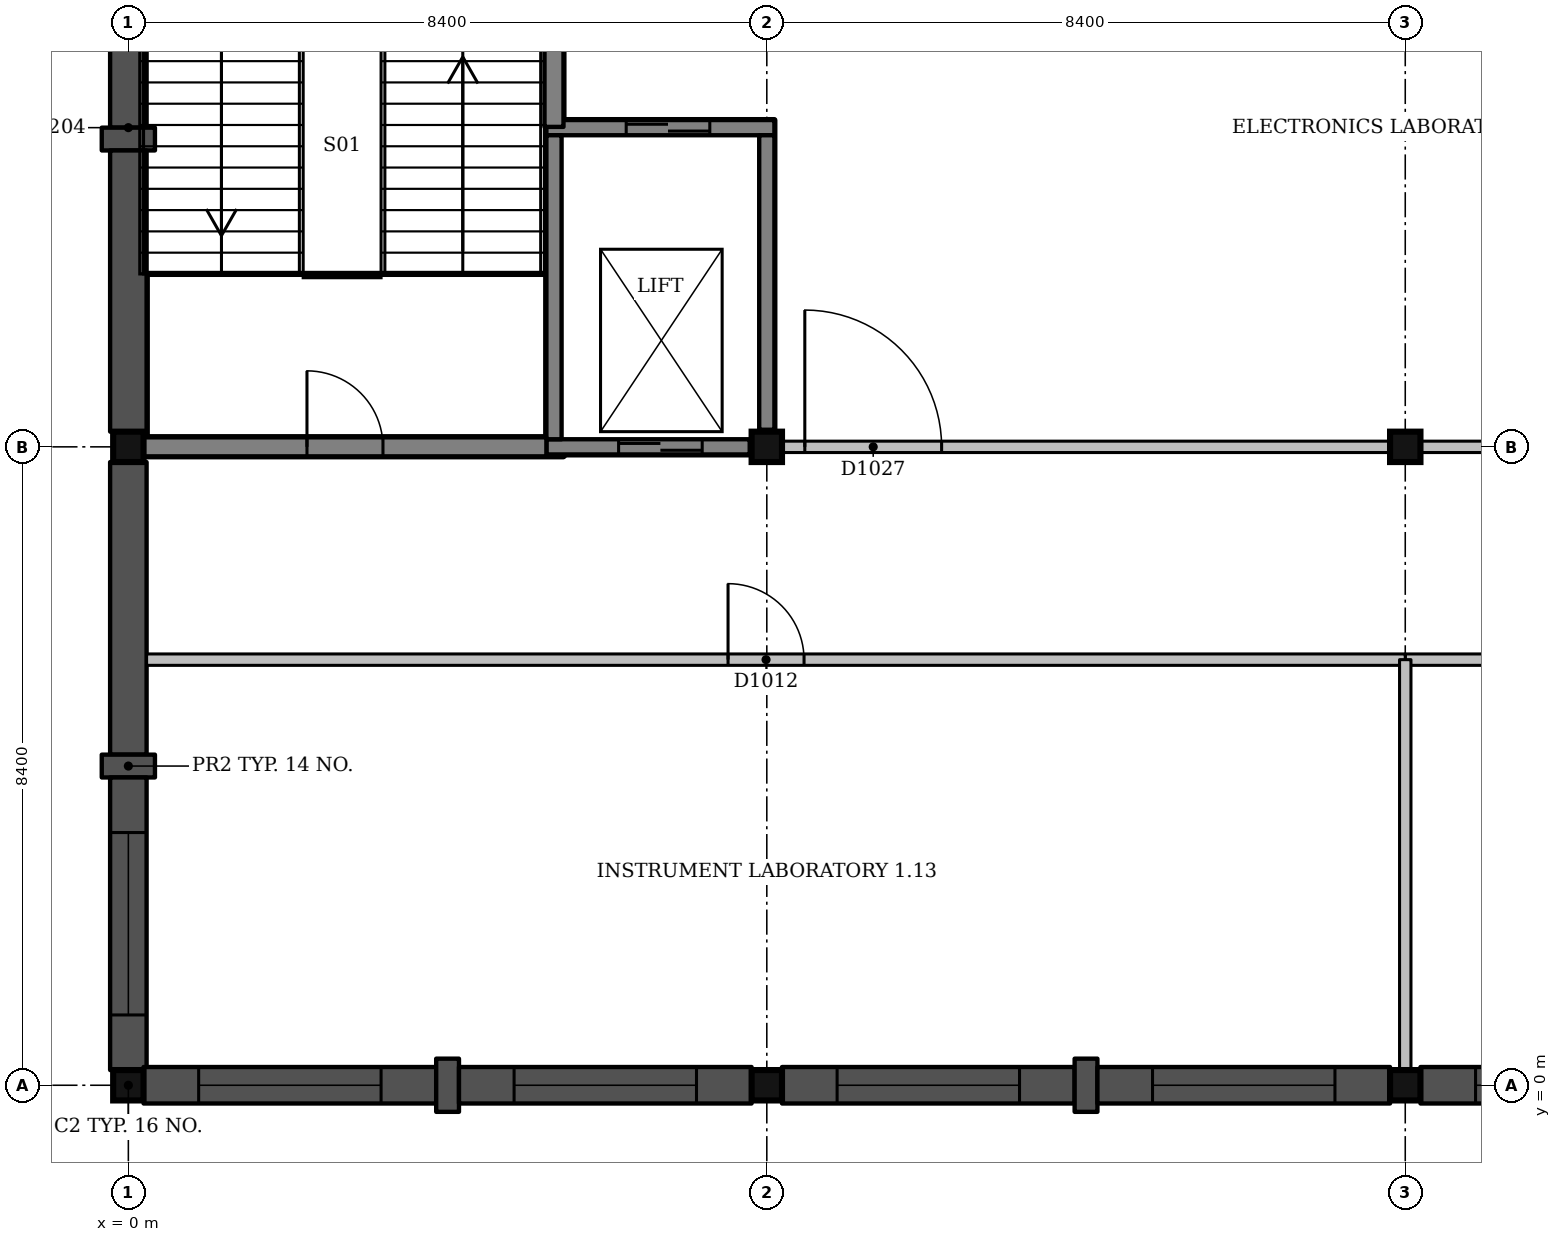
"""IFC4 building model, lengths in metres.
Left out: names, types, materials, properties, quantities, classifications, styles, units other than length and angle.
Written with IfcOpenShell. Run it as: python <this file> out.ifc"""

import sys

from ifc_helpers import new_model, si_unit, direction, frame, frame_2d, origin, origin_2d, place, context, subcontext, project, spatial, rectangle, extrude, element, fill, save


model = new_model("IFC4")
c1 = context("Model", 3, precision=1e-05, world=origin(), true_north=direction((0.0, 1.0)))
c2 = subcontext(c1, "Body", "Model", "MODEL_VIEW")
j1 = project(units=[si_unit("LENGTHUNIT", "METRE"), si_unit("PLANEANGLEUNIT", "RADIAN")], contexts=[c1])
p1 = place(None, origin())
s1 = spatial("IfcSite", under=j1, at=p1, CompositionType="ELEMENT")
p2 = place(p1, origin())
s2 = spatial("IfcBuilding", under=s1, at=p2, CompositionType="ELEMENT")
p3 = place(p2, frame((0.0, 0.0, 4.5)))
s3 = spatial("IfcBuildingStorey", under=s2, at=p3, CompositionType="ELEMENT", Elevation=4.5)
for number, where, z_axis, x_axis in (
    (1, (0.0, 0.0, 0.0), (0.0, 0.0, 1.0), (1.0, 0.0, 0.0)),
    (2, (0.0, 8.4, 0.0), (0.0, 0.0, 1.0), (1.0, 0.0, 0.0)),
    (3, (8.4, 0.0, 0.0), (0.0, 0.0, 1.0), (1.0, 0.0, 0.0)),
    (4, (8.4, 8.4, 0.0), (0.0, 0.0, 1.0), (1.0, 0.0, 0.0)),
    (5, (16.8, 0.0, 0.0), (0.0, 0.0, 1.0), (1.0, 0.0, 0.0)),
    (6, (16.8, 8.4, 0.0), (0.0, 0.0, 1.0), (1.0, 0.0, 0.0)),
):
    element("IfcColumn", number, at=place(p3, frame(where, z_axis=z_axis, x_axis=x_axis)), inside=s3, PredefinedType="COLUMN", context=c2, shape_type="SweptSolid", body=[
        extrude(rectangle(XDim=0.4, YDim=0.4, at=origin_2d()), origin(), (0.0, 0.0, 1.0), 4.5),
    ])
p4 = place(p3, frame((5.5, 8.4, 0.0), z_axis=(0.0, 0.0, 1.0), x_axis=(1.0, 0.0, 0.0)))
e7 = element("IfcWall", 7, at=p4, inside=s3, PredefinedType="SHEAR", context=c2, shape_type="SweptSolid", body=[
    extrude(rectangle(XDim=2.675, YDim=0.2, at=frame_2d((1.337, 0.0))), origin(), (0.0, 0.0, 1.0), 4.5),
])
p5 = place(p4, frame((0.95, 0.0, 0.0)))
e8 = element("IfcOpeningElement", 8, at=p5, cuts=e7, PredefinedType="OPENING", context=c2, shape_type="SweptSolid", body=[
    extrude(rectangle(XDim=1.1, YDim=2.1, at=frame_2d((0.55, 1.05))), frame((0.0, 0.11, 0.0), z_axis=(0.0, -1.0, 0.0), x_axis=(1.0, 0.0, 0.0)), (0.0, 0.0, 1.0), 0.22),
])
p6 = place(p3, frame((5.5, 12.6, 0.0), z_axis=(0.0, 0.0, 1.0), x_axis=(1.0, 0.0, 0.0)))
e9 = element("IfcWall", 9, at=p6, inside=s3, PredefinedType="SHEAR", context=c2, shape_type="SweptSolid", body=[
    extrude(rectangle(XDim=3.0, YDim=0.2, at=frame_2d((1.5, 0.0))), origin(), (0.0, 0.0, 1.0), 4.5),
])
p7 = place(p6, frame((1.05, 0.0, 0.0)))
e10 = element("IfcOpeningElement", 10, at=p7, cuts=e9, PredefinedType="OPENING", context=c2, shape_type="SweptSolid", body=[
    extrude(rectangle(XDim=1.1, YDim=2.1, at=frame_2d((0.55, 1.05))), frame((0.0, 0.11, 0.0), z_axis=(0.0, -1.0, 0.0), x_axis=(1.0, 0.0, 0.0)), (0.0, 0.0, 1.0), 0.22),
])
p8 = place(p3, frame((5.6, 8.5, 0.0), z_axis=(0.0, 0.0, 1.0), x_axis=(0.0, 1.0, 0.0)))
e11 = element("IfcWall", 11, at=p8, inside=s3, PredefinedType="SHEAR", context=c2, shape_type="SweptSolid", body=[
    extrude(rectangle(XDim=4.0, YDim=0.2, at=frame_2d((2.0, 0.0))), origin(), (0.0, 0.0, 1.0), 4.5),
])
p9 = place(p3, frame((8.4, 8.625, 0.0), z_axis=(0.0, 0.0, 1.0), x_axis=(0.0, 1.0, 0.0)))
e12 = element("IfcWall", 12, at=p9, inside=s3, PredefinedType="SHEAR", context=c2, shape_type="SweptSolid", body=[
    extrude(rectangle(XDim=3.875, YDim=0.2, at=frame_2d((1.938, 0.0))), origin(), (0.0, 0.0, 1.0), 4.5),
])
p10 = place(p3, frame((0.2, 8.4, 0.0), z_axis=(0.0, 0.0, 1.0), x_axis=(1.0, 0.0, 0.0)))
e13 = element("IfcWall", 13, at=p10, inside=s3, PredefinedType="SHEAR", context=c2, shape_type="SweptSolid", body=[
    extrude(rectangle(XDim=5.3, YDim=0.25, at=frame_2d((2.65, 0.0))), origin(), (0.0, 0.0, 1.0), 4.5),
])
p11 = place(p10, frame((2.15, 0.0, 0.0)))
e14 = element("IfcOpeningElement", 14, at=p11, cuts=e13, PredefinedType="OPENING", context=c2, shape_type="SweptSolid", body=[
    extrude(rectangle(XDim=1.0, YDim=2.1, at=frame_2d((0.5, 1.05))), frame((0.0, 0.135, 0.0), z_axis=(0.0, -1.0, 0.0), x_axis=(1.0, 0.0, 0.0)), (0.0, 0.0, 1.0), 0.27),
])
p12 = place(p3, frame((5.6, 12.61, 0.0), z_axis=(0.0, 0.0, 1.0), x_axis=(0.0, 1.0, 0.0)))
e15 = element("IfcWall", 15, at=p12, inside=s3, PredefinedType="SHEAR", context=c2, shape_type="SweptSolid", body=[
    extrude(rectangle(XDim=4.065, YDim=0.25, at=frame_2d((2.032, 0.0))), origin(), (0.0, 0.0, 1.0), 4.5),
])
p13 = place(p3, frame((0.0, 16.3, 0.0), z_axis=(0.0, 0.0, 1.0), x_axis=(0.0, -1.0, 0.0)))
e16 = element("IfcWall", 16, at=p13, inside=s3, PredefinedType="SOLIDWALL", context=c2, shape_type="SweptSolid", body=[
    extrude(rectangle(XDim=3.7, YDim=0.48, at=frame_2d((1.85, 0.0))), origin(), (0.0, 0.0, 1.0), 3.75),
])
p14 = place(p3, frame((0.0, 12.6, 0.0), z_axis=(0.0, 0.0, 1.0), x_axis=(0.0, -1.0, 0.0)))
e17 = element("IfcWall", 17, at=p14, inside=s3, PredefinedType="SOLIDWALL", context=c2, shape_type="SweptSolid", body=[
    extrude(rectangle(XDim=0.3, YDim=0.7, at=frame_2d((0.15, 0.0))), origin(), (0.0, 0.0, 1.0), 3.75),
])
p15 = place(p3, frame((0.0, 12.3, 0.0), z_axis=(0.0, 0.0, 1.0), x_axis=(0.0, -1.0, 0.0)))
e18 = element("IfcWall", 18, at=p15, inside=s3, PredefinedType="SOLIDWALL", context=c2, shape_type="SweptSolid", body=[
    extrude(rectangle(XDim=3.7, YDim=0.48, at=frame_2d((1.85, 0.0))), origin(), (0.0, 0.0, 1.0), 3.75),
])
p16 = place(p3, frame((0.0, 8.2, 0.0), z_axis=(0.0, 0.0, 1.0), x_axis=(0.0, -1.0, 0.0)))
e19 = element("IfcWall", 19, at=p16, inside=s3, PredefinedType="SOLIDWALL", context=c2, shape_type="SweptSolid", body=[
    extrude(rectangle(XDim=3.85, YDim=0.48, at=frame_2d((1.925, 0.0))), origin(), (0.0, 0.0, 1.0), 3.45),
])
p17 = place(p3, frame((0.0, 4.35, 0.0), z_axis=(0.0, 0.0, 1.0), x_axis=(0.0, -1.0, 0.0)))
e20 = element("IfcWall", 20, at=p17, inside=s3, PredefinedType="SOLIDWALL", context=c2, shape_type="SweptSolid", body=[
    extrude(rectangle(XDim=0.3, YDim=0.7, at=frame_2d((0.15, 0.0))), origin(), (0.0, 0.0, 1.0), 3.45),
])
p18 = place(p3, frame((0.0, 4.05, 0.0), z_axis=(0.0, 0.0, 1.0), x_axis=(0.0, -1.0, 0.0)))
e21 = element("IfcWall", 21, at=p18, inside=s3, PredefinedType="SOLIDWALL", context=c2, shape_type="SweptSolid", body=[
    extrude(rectangle(XDim=3.85, YDim=0.48, at=frame_2d((1.925, 0.0))), origin(), (0.0, 0.0, 1.0), 3.45),
])
p19 = place(p18, frame((0.725, 0.0, 2.4)))
e22 = element("IfcOpeningElement", 22, at=p19, cuts=e21, PredefinedType="OPENING", context=c2, shape_type="SweptSolid", body=[
    extrude(rectangle(XDim=2.4, YDim=0.6, at=frame_2d((1.2, 0.3))), frame((0.0, 0.25, 0.0), z_axis=(0.0, -1.0, 0.0), x_axis=(1.0, 0.0, 0.0)), (0.0, 0.0, 1.0), 0.5),
])
p20 = place(p3, frame((0.2, 0.0, 0.0), z_axis=(0.0, 0.0, 1.0), x_axis=(1.0, 0.0, 0.0)))
e23 = element("IfcWall", 23, at=p20, inside=s3, PredefinedType="SOLIDWALL", context=c2, shape_type="SweptSolid", body=[
    extrude(rectangle(XDim=3.85, YDim=0.48, at=frame_2d((1.925, 0.0))), origin(), (0.0, 0.0, 1.0), 3.45),
])
p21 = place(p20, frame((0.725, 0.0, 2.4)))
e24 = element("IfcOpeningElement", 24, at=p21, cuts=e23, PredefinedType="OPENING", context=c2, shape_type="SweptSolid", body=[
    extrude(rectangle(XDim=2.4, YDim=0.6, at=frame_2d((1.2, 0.3))), frame((0.0, 0.25, 0.0), z_axis=(0.0, -1.0, 0.0), x_axis=(1.0, 0.0, 0.0)), (0.0, 0.0, 1.0), 0.5),
])
p22 = place(p3, frame((4.05, 0.0, 0.0), z_axis=(0.0, 0.0, 1.0), x_axis=(1.0, 0.0, 0.0)))
e25 = element("IfcWall", 25, at=p22, inside=s3, PredefinedType="SOLIDWALL", context=c2, shape_type="SweptSolid", body=[
    extrude(rectangle(XDim=0.3, YDim=0.7, at=frame_2d((0.15, 0.0))), origin(), (0.0, 0.0, 1.0), 3.45),
])
p23 = place(p3, frame((4.35, 0.0, 0.0), z_axis=(0.0, 0.0, 1.0), x_axis=(1.0, 0.0, 0.0)))
e26 = element("IfcWall", 26, at=p23, inside=s3, PredefinedType="SOLIDWALL", context=c2, shape_type="SweptSolid", body=[
    extrude(rectangle(XDim=3.85, YDim=0.48, at=frame_2d((1.925, 0.0))), origin(), (0.0, 0.0, 1.0), 3.45),
])
p24 = place(p23, frame((0.725, 0.0, 2.4)))
e27 = element("IfcOpeningElement", 27, at=p24, cuts=e26, PredefinedType="OPENING", context=c2, shape_type="SweptSolid", body=[
    extrude(rectangle(XDim=2.4, YDim=0.6, at=frame_2d((1.2, 0.3))), frame((0.0, 0.25, 0.0), z_axis=(0.0, -1.0, 0.0), x_axis=(1.0, 0.0, 0.0)), (0.0, 0.0, 1.0), 0.5),
])
p25 = place(p3, frame((8.6, 0.0, 0.0), z_axis=(0.0, 0.0, 1.0), x_axis=(1.0, 0.0, 0.0)))
e28 = element("IfcWall", 28, at=p25, inside=s3, PredefinedType="SOLIDWALL", context=c2, shape_type="SweptSolid", body=[
    extrude(rectangle(XDim=3.85, YDim=0.48, at=frame_2d((1.925, 0.0))), origin(), (0.0, 0.0, 1.0), 3.45),
])
p26 = place(p25, frame((0.725, 0.0, 2.4)))
e29 = element("IfcOpeningElement", 29, at=p26, cuts=e28, PredefinedType="OPENING", context=c2, shape_type="SweptSolid", body=[
    extrude(rectangle(XDim=2.4, YDim=0.6, at=frame_2d((1.2, 0.3))), frame((0.0, 0.25, 0.0), z_axis=(0.0, -1.0, 0.0), x_axis=(1.0, 0.0, 0.0)), (0.0, 0.0, 1.0), 0.5),
])
p27 = place(p3, frame((12.45, 0.0, 0.0), z_axis=(0.0, 0.0, 1.0), x_axis=(1.0, 0.0, 0.0)))
e30 = element("IfcWall", 30, at=p27, inside=s3, PredefinedType="SOLIDWALL", context=c2, shape_type="SweptSolid", body=[
    extrude(rectangle(XDim=0.3, YDim=0.7, at=frame_2d((0.15, 0.0))), origin(), (0.0, 0.0, 1.0), 3.45),
])
p28 = place(p3, frame((12.75, 0.0, 0.0), z_axis=(0.0, 0.0, 1.0), x_axis=(1.0, 0.0, 0.0)))
e31 = element("IfcWall", 31, at=p28, inside=s3, PredefinedType="SOLIDWALL", context=c2, shape_type="SweptSolid", body=[
    extrude(rectangle(XDim=3.85, YDim=0.48, at=frame_2d((1.925, 0.0))), origin(), (0.0, 0.0, 1.0), 3.45),
])
p29 = place(p28, frame((0.725, 0.0, 2.4)))
e32 = element("IfcOpeningElement", 32, at=p29, cuts=e31, PredefinedType="OPENING", context=c2, shape_type="SweptSolid", body=[
    extrude(rectangle(XDim=2.4, YDim=0.6, at=frame_2d((1.2, 0.3))), frame((0.0, 0.25, 0.0), z_axis=(0.0, -1.0, 0.0), x_axis=(1.0, 0.0, 0.0)), (0.0, 0.0, 1.0), 0.5),
])
p30 = place(p3, frame((17.0, 0.0, 0.0), z_axis=(0.0, 0.0, 1.0), x_axis=(1.0, 0.0, 0.0)))
e33 = element("IfcWall", 33, at=p30, inside=s3, PredefinedType="SOLIDWALL", context=c2, shape_type="SweptSolid", body=[
    extrude(rectangle(XDim=3.85, YDim=0.48, at=frame_2d((1.925, 0.0))), origin(), (0.0, 0.0, 1.0), 3.45),
])
p31 = place(p30, frame((0.725, 0.0, 2.4)))
e34 = element("IfcOpeningElement", 34, at=p31, cuts=e33, PredefinedType="OPENING", context=c2, shape_type="SweptSolid", body=[
    extrude(rectangle(XDim=2.4, YDim=0.6, at=frame_2d((1.2, 0.3))), frame((0.0, 0.25, 0.0), z_axis=(0.0, -1.0, 0.0), x_axis=(1.0, 0.0, 0.0)), (0.0, 0.0, 1.0), 0.5),
])
p32 = place(p3, frame((16.8, 5.6, 0.0), z_axis=(0.0, 0.0, 1.0), x_axis=(1.0, 0.0, 0.0)))
e35 = element("IfcWall", 35, at=p32, inside=s3, PredefinedType="PARTITIONING", context=c2, shape_type="SweptSolid", body=[
    extrude(rectangle(XDim=16.8, YDim=0.15, at=frame_2d((8.4, 0.0))), origin(), (0.0, 0.0, 1.0), 3.5),
])
p33 = place(p32, frame((3.8, 0.0, 0.0)))
e36 = element("IfcOpeningElement", 36, at=p33, cuts=e35, PredefinedType="OPENING", context=c2, shape_type="SweptSolid", body=[
    extrude(rectangle(XDim=0.9, YDim=2.1, at=frame_2d((0.45, 1.05))), frame((0.0, 0.085, 0.0), z_axis=(0.0, -1.0, 0.0), x_axis=(1.0, 0.0, 0.0)), (0.0, 0.0, 1.0), 0.17),
])
p34 = place(p32, frame((12.2, 0.0, 0.0)))
e37 = element("IfcOpeningElement", 37, at=p34, cuts=e35, PredefinedType="OPENING", context=c2, shape_type="SweptSolid", body=[
    extrude(rectangle(XDim=0.9, YDim=2.1, at=frame_2d((0.45, 1.05))), frame((0.0, 0.085, 0.0), z_axis=(0.0, -1.0, 0.0), x_axis=(1.0, 0.0, 0.0)), (0.0, 0.0, 1.0), 0.17),
])
p35 = place(p3, frame((0.24, 5.6, 0.0), z_axis=(0.0, 0.0, 1.0), x_axis=(1.0, 0.0, 0.0)))
e38 = element("IfcWall", 38, at=p35, inside=s3, PredefinedType="PARTITIONING", context=c2, shape_type="SweptSolid", body=[
    extrude(rectangle(XDim=16.56, YDim=0.15, at=frame_2d((8.28, 0.0))), origin(), (0.0, 0.0, 1.0), 3.5),
])
p36 = place(p35, frame((7.65, 0.0, 0.0)))
e39 = element("IfcOpeningElement", 39, at=p36, cuts=e38, PredefinedType="OPENING", context=c2, shape_type="SweptSolid", body=[
    extrude(rectangle(XDim=1.0, YDim=2.1, at=frame_2d((0.5, 1.05))), frame((0.0, 0.085, 0.0), z_axis=(0.0, -1.0, 0.0), x_axis=(1.0, 0.0, 0.0)), (0.0, 0.0, 1.0), 0.17),
])
p37 = place(p3, frame((8.6, 8.4, 0.0), z_axis=(0.0, 0.0, 1.0), x_axis=(1.0, 0.0, 0.0)))
e40 = element("IfcWall", 40, at=p37, inside=s3, PredefinedType="PARTITIONING", context=c2, shape_type="SweptSolid", body=[
    extrude(rectangle(XDim=8.0, YDim=0.15, at=frame_2d((4.0, 0.0))), origin(), (0.0, 0.0, 1.0), 3.5),
])
p38 = place(p37, frame((0.3, 0.0, 0.0)))
e41 = element("IfcOpeningElement", 41, at=p38, cuts=e40, PredefinedType="OPENING", context=c2, shape_type="SweptSolid", body=[
    extrude(rectangle(XDim=1.8, YDim=2.1, at=frame_2d((0.9, 1.05))), frame((0.0, 0.085, 0.0), z_axis=(0.0, -1.0, 0.0), x_axis=(1.0, 0.0, 0.0)), (0.0, 0.0, 1.0), 0.17),
])
p39 = place(p3, frame((17.0, 8.4, 0.0), z_axis=(0.0, 0.0, 1.0), x_axis=(1.0, 0.0, 0.0)))
e42 = element("IfcWall", 42, at=p39, inside=s3, PredefinedType="PARTITIONING", context=c2, shape_type="SweptSolid", body=[
    extrude(rectangle(XDim=8.0, YDim=0.15, at=frame_2d((4.0, 0.0))), origin(), (0.0, 0.0, 1.0), 3.5),
])
p40 = place(p39, frame((3.1, 0.0, 0.0)))
e43 = element("IfcOpeningElement", 43, at=p40, cuts=e42, PredefinedType="OPENING", context=c2, shape_type="SweptSolid", body=[
    extrude(rectangle(XDim=1.8, YDim=2.1, at=frame_2d((0.9, 1.05))), frame((0.0, 0.085, 0.0), z_axis=(0.0, -1.0, 0.0), x_axis=(1.0, 0.0, 0.0)), (0.0, 0.0, 1.0), 0.17),
])
p41 = place(p3, frame((16.8, 0.2, 0.0), z_axis=(0.0, 0.0, 1.0), x_axis=(0.0, 1.0, 0.0)))
e44 = element("IfcWall", 44, at=p41, inside=s3, PredefinedType="PARTITIONING", context=c2, shape_type="SweptSolid", body=[
    extrude(rectangle(XDim=5.4, YDim=0.15, at=frame_2d((2.7, 0.0))), origin(), (0.0, 0.0, 1.0), 3.5),
])
p42 = place(p19, origin())
e45 = element("IfcWindow", 45, at=p42, inside=s3, PartitioningType="SINGLE_PANEL", PredefinedType="WINDOW", context=c2, shape_type="SweptSolid", body=[
    extrude(rectangle(XDim=2.4, YDim=0.6, at=frame_2d((1.2, 0.3))), frame((0.0, 0.12, 0.0), z_axis=(0.0, -1.0, 0.0), x_axis=(1.0, 0.0, 0.0)), (0.0, 0.0, 1.0), 0.06),
])
fill(e22, e45)
p43 = place(p21, origin())
e46 = element("IfcWindow", 46, at=p43, inside=s3, PartitioningType="SINGLE_PANEL", PredefinedType="WINDOW", context=c2, shape_type="SweptSolid", body=[
    extrude(rectangle(XDim=2.4, YDim=0.6, at=frame_2d((1.2, 0.3))), frame((0.0, 0.12, 0.0), z_axis=(0.0, -1.0, 0.0), x_axis=(1.0, 0.0, 0.0)), (0.0, 0.0, 1.0), 0.06),
])
fill(e24, e46)
p44 = place(p24, origin())
e47 = element("IfcWindow", 47, at=p44, inside=s3, PartitioningType="SINGLE_PANEL", PredefinedType="WINDOW", context=c2, shape_type="SweptSolid", body=[
    extrude(rectangle(XDim=2.4, YDim=0.6, at=frame_2d((1.2, 0.3))), frame((0.0, 0.12, 0.0), z_axis=(0.0, -1.0, 0.0), x_axis=(1.0, 0.0, 0.0)), (0.0, 0.0, 1.0), 0.06),
])
fill(e27, e47)
p45 = place(p26, origin())
e48 = element("IfcWindow", 48, at=p45, inside=s3, PartitioningType="SINGLE_PANEL", PredefinedType="WINDOW", context=c2, shape_type="SweptSolid", body=[
    extrude(rectangle(XDim=2.4, YDim=0.6, at=frame_2d((1.2, 0.3))), frame((0.0, 0.12, 0.0), z_axis=(0.0, -1.0, 0.0), x_axis=(1.0, 0.0, 0.0)), (0.0, 0.0, 1.0), 0.06),
])
fill(e29, e48)
p46 = place(p29, origin())
e49 = element("IfcWindow", 49, at=p46, inside=s3, PartitioningType="SINGLE_PANEL", PredefinedType="WINDOW", context=c2, shape_type="SweptSolid", body=[
    extrude(rectangle(XDim=2.4, YDim=0.6, at=frame_2d((1.2, 0.3))), frame((0.0, 0.12, 0.0), z_axis=(0.0, -1.0, 0.0), x_axis=(1.0, 0.0, 0.0)), (0.0, 0.0, 1.0), 0.06),
])
fill(e32, e49)
p47 = place(p31, origin())
e50 = element("IfcWindow", 50, at=p47, inside=s3, PartitioningType="SINGLE_PANEL", PredefinedType="WINDOW", context=c2, shape_type="SweptSolid", body=[
    extrude(rectangle(XDim=2.4, YDim=0.6, at=frame_2d((1.2, 0.3))), frame((0.0, 0.12, 0.0), z_axis=(0.0, -1.0, 0.0), x_axis=(1.0, 0.0, 0.0)), (0.0, 0.0, 1.0), 0.06),
])
fill(e34, e50)
p48 = place(p36, origin())
e51 = element("IfcDoor", 51, at=p48, inside=s3, OperationType="SINGLE_SWING_LEFT", PredefinedType="DOOR", context=c2, shape_type="SweptSolid", body=[
    extrude(rectangle(XDim=1.0, YDim=2.1, at=frame_2d((0.5, 1.05))), frame((0.0, 0.025, 0.0), z_axis=(0.0, -1.0, 0.0), x_axis=(1.0, 0.0, 0.0)), (0.0, 0.0, 1.0), 0.05),
])
fill(e39, e51)
p49 = place(p38, origin())
e52 = element("IfcDoor", 52, at=p49, inside=s3, OperationType="DOUBLE_DOOR_SINGLE_SWING", PredefinedType="DOOR", context=c2, shape_type="SweptSolid", body=[
    extrude(rectangle(XDim=1.8, YDim=2.1, at=frame_2d((0.9, 1.05))), frame((0.0, 0.025, 0.0), z_axis=(0.0, -1.0, 0.0), x_axis=(1.0, 0.0, 0.0)), (0.0, 0.0, 1.0), 0.05),
])
fill(e41, e52)
p50 = place(p11, origin())
e53 = element("IfcDoor", 53, at=p50, inside=s3, OperationType="SINGLE_SWING_LEFT", PredefinedType="DOOR", context=c2, shape_type="SweptSolid", body=[
    extrude(rectangle(XDim=1.0, YDim=2.1, at=frame_2d((0.5, 1.05))), frame((0.0, 0.025, 0.0), z_axis=(0.0, -1.0, 0.0), x_axis=(1.0, 0.0, 0.0)), (0.0, 0.0, 1.0), 0.05),
])
fill(e14, e53)
p51 = place(p5, origin())
e54 = element("IfcDoor", 54, at=p51, inside=s3, OperationType="SLIDING_TO_LEFT", PredefinedType="DOOR", context=c2, shape_type="SweptSolid", body=[
    extrude(rectangle(XDim=1.1, YDim=2.1, at=frame_2d((0.55, 1.05))), frame((0.0, 0.025, 0.0), z_axis=(0.0, -1.0, 0.0), x_axis=(1.0, 0.0, 0.0)), (0.0, 0.0, 1.0), 0.05),
])
fill(e8, e54)
p52 = place(p7, origin())
e55 = element("IfcDoor", 55, at=p52, inside=s3, OperationType="SLIDING_TO_RIGHT", PredefinedType="DOOR", context=c2, shape_type="SweptSolid", body=[
    extrude(rectangle(XDim=1.1, YDim=2.1, at=frame_2d((0.55, 1.05))), frame((0.0, 0.025, 0.0), z_axis=(0.0, -1.0, 0.0), x_axis=(1.0, 0.0, 0.0)), (0.0, 0.0, 1.0), 0.05),
])
fill(e10, e55)
save(model, sys.argv[1])
